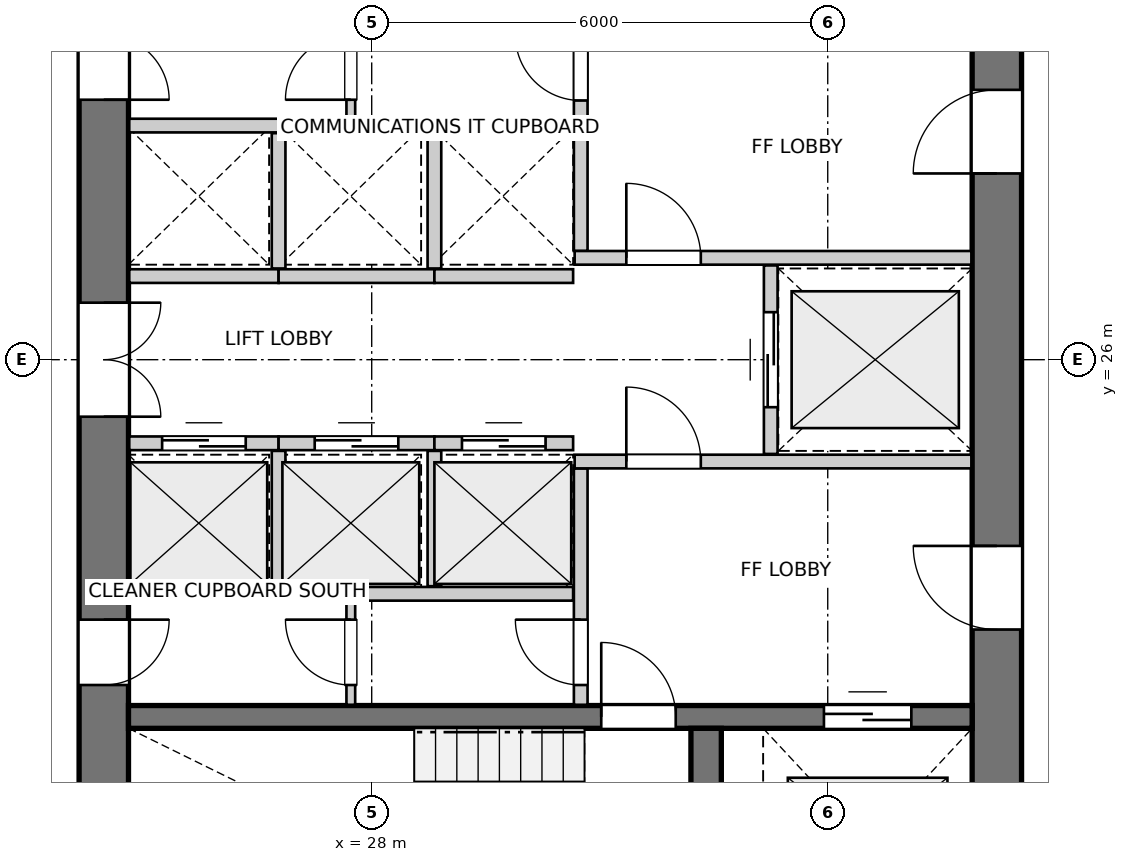
"""IFC4 building model, lengths in metres.
Left out: names, types, materials, properties, quantities, classifications, styles, units other than length and angle.
Written with IfcOpenShell. Run it as: python <this file> out.ifc"""

import sys

from ifc_helpers import new_model, si_unit, direction, frame, frame_2d, origin, place, context, subcontext, project, spatial, rectangle, extrude, source, transform, mapped, element, fill, save


model = new_model("IFC4")
c1 = context("Model", 3, precision=1e-05, world=origin(), true_north=direction((0.0, 1.0)))
c2 = subcontext(c1, "Body", "Model", "MODEL_VIEW")
j1 = project(units=[si_unit("LENGTHUNIT", "METRE"), si_unit("PLANEANGLEUNIT", "RADIAN")], contexts=[c1])
p1 = place(None, origin())
s1 = spatial("IfcSite", under=j1, at=p1, CompositionType="ELEMENT")
p2 = place(p1, origin())
s2 = spatial("IfcBuilding", under=s1, at=p2, CompositionType="ELEMENT")
p3 = place(p2, frame((0.0, 0.0, 83.2)))
s3 = spatial("IfcBuildingStorey", under=s2, at=p3, CompositionType="ELEMENT", Elevation=83.2)
p4 = place(p3, frame((24.475, 33.8, 0.0), z_axis=(0.0, 0.0, 1.0), x_axis=(0.0, -1.0, 0.0)))
e1 = element("IfcWall", 1, at=p4, inside=s3, PredefinedType="SHEAR", context=c2, shape_type="SweptSolid", body=[
    extrude(rectangle(XDim=15.6, YDim=0.65, at=frame_2d((7.8, 0.0))), origin(), (0.0, 0.0, 1.0), 2.935),
])
p5 = place(p4, frame((7.05, 0.0, 0.0)))
e2 = element("IfcOpeningElement", 2, at=p5, cuts=e1, PredefinedType="OPENING", context=c2, shape_type="SweptSolid", body=[
    extrude(rectangle(XDim=1.5, YDim=2.15, at=frame_2d((0.75, 1.075))), frame((0.0, 0.335, 0.0), z_axis=(0.0, -1.0, 0.0), x_axis=(1.0, 0.0, 0.0)), (0.0, 0.0, 1.0), 0.67),
])
p6 = place(p4, frame((3.52, 0.0, 0.0)))
e3 = element("IfcOpeningElement", 3, at=p6, cuts=e1, PredefinedType="OPENING", context=c2, shape_type="SweptSolid", body=[
    extrude(rectangle(XDim=0.86, YDim=2.05, at=frame_2d((0.43, 1.025))), frame((0.0, 0.335, 0.0), z_axis=(0.0, -1.0, 0.0), x_axis=(1.0, 0.0, 0.0)), (0.0, 0.0, 1.0), 0.67),
])
p7 = place(p4, frame((11.22, 0.0, 0.0)))
e4 = element("IfcOpeningElement", 4, at=p7, cuts=e1, PredefinedType="OPENING", context=c2, shape_type="SweptSolid", body=[
    extrude(rectangle(XDim=0.86, YDim=2.05, at=frame_2d((0.43, 1.025))), frame((0.0, 0.335, 0.0), z_axis=(0.0, -1.0, 0.0), x_axis=(1.0, 0.0, 0.0)), (0.0, 0.0, 1.0), 0.67),
])
p8 = place(p3, frame((36.225, 18.2, 0.0), z_axis=(0.0, 0.0, 1.0), x_axis=(0.0, 1.0, 0.0)))
e5 = element("IfcWall", 5, at=p8, inside=s3, PredefinedType="SHEAR", context=c2, shape_type="SweptSolid", body=[
    extrude(rectangle(XDim=15.6, YDim=0.65, at=frame_2d((7.8, 0.0))), origin(), (0.0, 0.0, 1.0), 2.935),
])
p9 = place(p8, frame((4.25, 0.0, 0.0)))
e6 = element("IfcOpeningElement", 6, at=p9, cuts=e5, PredefinedType="OPENING", context=c2, shape_type="SweptSolid", body=[
    extrude(rectangle(XDim=1.1, YDim=2.15, at=frame_2d((0.55, 1.075))), frame((0.0, 0.335, 0.0), z_axis=(0.0, -1.0, 0.0), x_axis=(1.0, 0.0, 0.0)), (0.0, 0.0, 1.0), 0.67),
])
p10 = place(p8, frame((10.25, 0.0, 0.0)))
e7 = element("IfcOpeningElement", 7, at=p10, cuts=e5, PredefinedType="OPENING", context=c2, shape_type="SweptSolid", body=[
    extrude(rectangle(XDim=1.1, YDim=2.15, at=frame_2d((0.55, 1.075))), frame((0.0, 0.335, 0.0), z_axis=(0.0, -1.0, 0.0), x_axis=(1.0, 0.0, 0.0)), (0.0, 0.0, 1.0), 0.67),
])
p11 = place(p3, frame((24.8, 21.3, 0.0), z_axis=(0.0, 0.0, 1.0), x_axis=(1.0, 0.0, 0.0)))
e8 = element("IfcWall", 8, at=p11, inside=s3, PredefinedType="SHEAR", context=c2, shape_type="SweptSolid", body=[
    extrude(rectangle(XDim=11.1, YDim=0.3, at=frame_2d((5.55, 0.0))), origin(), (0.0, 0.0, 1.0), 2.935),
])
p12 = place(p11, frame((6.22, 0.0, 0.0)))
e9 = element("IfcOpeningElement", 9, at=p12, cuts=e8, PredefinedType="OPENING", context=c2, shape_type="SweptSolid", body=[
    extrude(rectangle(XDim=0.98, YDim=2.15, at=frame_2d((0.49, 1.075))), frame((0.0, 0.16, 0.0), z_axis=(0.0, -1.0, 0.0), x_axis=(1.0, 0.0, 0.0)), (0.0, 0.0, 1.0), 0.32),
])
p13 = place(p11, frame((9.15, 0.0, 0.0)))
e10 = element("IfcOpeningElement", 10, at=p13, cuts=e8, PredefinedType="OPENING", context=c2, shape_type="SweptSolid", body=[
    extrude(rectangle(XDim=1.15, YDim=2.15, at=frame_2d((0.575, 1.075))), frame((0.0, 0.16, 0.0), z_axis=(0.0, -1.0, 0.0), x_axis=(1.0, 0.0, 0.0)), (0.0, 0.0, 1.0), 0.32),
])
p14 = place(p3, frame((32.4, 18.2, 0.0), z_axis=(0.0, 0.0, 1.0), x_axis=(0.0, 1.0, 0.0)))
e11 = element("IfcWall", 11, at=p14, inside=s3, PredefinedType="SHEAR", context=c2, shape_type="SweptSolid", body=[
    extrude(rectangle(XDim=2.95, YDim=0.4, at=frame_2d((1.475, 0.0))), origin(), (0.0, 0.0, 1.0), 2.935),
])
p15 = place(p3, frame((30.75, 21.46, 0.0), z_axis=(0.0, 0.0, 1.0), x_axis=(0.0, 1.0, 0.0)))
e12 = element("IfcWall", 12, at=p15, inside=s3, PredefinedType="PARTITIONING", context=c2, shape_type="SweptSolid", body=[
    extrude(rectangle(XDim=3.11, YDim=0.18, at=frame_2d((1.555, 0.0))), origin(), (0.0, 0.0, 1.0), 2.935),
])
p16 = place(p15, frame((0.26, 0.0, 0.0)))
e13 = element("IfcOpeningElement", 13, at=p16, cuts=e12, PredefinedType="OPENING", context=c2, shape_type="SweptSolid", body=[
    extrude(rectangle(XDim=0.86, YDim=2.05, at=frame_2d((0.43, 1.025))), frame((0.0, 0.1, 0.0), z_axis=(0.0, -1.0, 0.0), x_axis=(1.0, 0.0, 0.0)), (0.0, 0.0, 1.0), 0.2),
])
p17 = place(p3, frame((30.67, 24.66, 0.0), z_axis=(0.0, 0.0, 1.0), x_axis=(1.0, 0.0, 0.0)))
e14 = element("IfcWall", 14, at=p17, inside=s3, PredefinedType="PARTITIONING", context=c2, shape_type="SweptSolid", body=[
    extrude(rectangle(XDim=5.22, YDim=0.18, at=frame_2d((2.61, 0.0))), origin(), (0.0, 0.0, 1.0), 2.935),
])
p18 = place(p17, frame((0.68, 0.0, 0.0)))
e15 = element("IfcOpeningElement", 15, at=p18, cuts=e14, PredefinedType="OPENING", context=c2, shape_type="SweptSolid", body=[
    extrude(rectangle(XDim=0.98, YDim=2.15, at=frame_2d((0.49, 1.075))), frame((0.0, 0.1, 0.0), z_axis=(0.0, -1.0, 0.0), x_axis=(1.0, 0.0, 0.0)), (0.0, 0.0, 1.0), 0.2),
])
p19 = place(p3, frame((30.75, 27.43, 0.0), z_axis=(0.0, 0.0, 1.0), x_axis=(0.0, 1.0, 0.0)))
e16 = element("IfcWall", 16, at=p19, inside=s3, PredefinedType="PARTITIONING", context=c2, shape_type="SweptSolid", body=[
    extrude(rectangle(XDim=3.11, YDim=0.18, at=frame_2d((1.555, 0.0))), origin(), (0.0, 0.0, 1.0), 2.935),
])
p20 = place(p19, frame((1.98, 0.0, 0.0)))
e17 = element("IfcOpeningElement", 17, at=p20, cuts=e16, PredefinedType="OPENING", context=c2, shape_type="SweptSolid", body=[
    extrude(rectangle(XDim=0.86, YDim=2.05, at=frame_2d((0.43, 1.025))), frame((0.0, 0.1, 0.0), z_axis=(0.0, -1.0, 0.0), x_axis=(1.0, 0.0, 0.0)), (0.0, 0.0, 1.0), 0.2),
])
p21 = place(p3, frame((30.67, 27.34, 0.0), z_axis=(0.0, 0.0, 1.0), x_axis=(1.0, 0.0, 0.0)))
e18 = element("IfcWall", 18, at=p21, inside=s3, PredefinedType="PARTITIONING", context=c2, shape_type="SweptSolid", body=[
    extrude(rectangle(XDim=5.22, YDim=0.18, at=frame_2d((2.61, 0.0))), origin(), (0.0, 0.0, 1.0), 2.935),
])
p22 = place(p21, frame((0.68, 0.0, 0.0)))
e19 = element("IfcOpeningElement", 19, at=p22, cuts=e18, PredefinedType="OPENING", context=c2, shape_type="SweptSolid", body=[
    extrude(rectangle(XDim=0.98, YDim=2.15, at=frame_2d((0.49, 1.075))), frame((0.0, 0.1, 0.0), z_axis=(0.0, -1.0, 0.0), x_axis=(1.0, 0.0, 0.0)), (0.0, 0.0, 1.0), 0.2),
])
p23 = place(p3, frame((33.25, 24.76, 0.0), z_axis=(0.0, 0.0, 1.0), x_axis=(0.0, 1.0, 0.0)))
e20 = element("IfcWall", 20, at=p23, inside=s3, PredefinedType="PARTITIONING", context=c2, shape_type="SweptSolid", body=[
    extrude(rectangle(XDim=2.48, YDim=0.18, at=frame_2d((1.24, 0.0))), origin(), (0.0, 0.0, 1.0), 2.935),
])
p24 = place(p23, frame((0.615, 0.0, 0.0)))
e21 = element("IfcOpeningElement", 21, at=p24, cuts=e20, PredefinedType="OPENING", context=c2, shape_type="SweptSolid", body=[
    extrude(rectangle(XDim=1.25, YDim=2.15, at=frame_2d((0.625, 1.075))), frame((0.0, 0.1, 0.0), z_axis=(0.0, -1.0, 0.0), x_axis=(1.0, 0.0, 0.0)), (0.0, 0.0, 1.0), 0.2),
])
p25 = place(p3, frame((24.81, 22.92, 0.0), z_axis=(0.0, 0.0, 1.0), x_axis=(1.0, 0.0, 0.0)))
e22 = element("IfcWall", 22, at=p25, inside=s3, PredefinedType="PARTITIONING", context=c2, shape_type="SweptSolid", body=[
    extrude(rectangle(XDim=5.84, YDim=0.18, at=frame_2d((2.92, 0.0))), origin(), (0.0, 0.0, 1.0), 2.935),
])
p26 = place(p3, frame((24.81, 24.9, 0.0), z_axis=(0.0, 0.0, 1.0), x_axis=(1.0, 0.0, 0.0)))
e23 = element("IfcWall", 23, at=p26, inside=s3, PredefinedType="PARTITIONING", context=c2, shape_type="SweptSolid", body=[
    extrude(rectangle(XDim=1.965, YDim=0.18, at=frame_2d((0.982, 0.0))), origin(), (0.0, 0.0, 1.0), 2.935),
])
p27 = place(p26, frame((0.433, 0.0, 0.0)))
e24 = element("IfcOpeningElement", 24, at=p27, cuts=e23, PredefinedType="OPENING", context=c2, shape_type="SweptSolid", body=[
    extrude(rectangle(XDim=1.1, YDim=2.15, at=frame_2d((0.55, 1.075))), frame((0.0, 0.1, 0.0), z_axis=(0.0, -1.0, 0.0), x_axis=(1.0, 0.0, 0.0)), (0.0, 0.0, 1.0), 0.2),
])
p28 = place(p3, frame((26.775, 24.9, 0.0), z_axis=(0.0, 0.0, 1.0), x_axis=(1.0, 0.0, 0.0)))
e25 = element("IfcWall", 25, at=p28, inside=s3, PredefinedType="PARTITIONING", context=c2, shape_type="SweptSolid", body=[
    extrude(rectangle(XDim=2.05, YDim=0.18, at=frame_2d((1.025, 0.0))), origin(), (0.0, 0.0, 1.0), 2.935),
])
p29 = place(p28, frame((0.475, 0.0, 0.0)))
e26 = element("IfcOpeningElement", 26, at=p29, cuts=e25, PredefinedType="OPENING", context=c2, shape_type="SweptSolid", body=[
    extrude(rectangle(XDim=1.1, YDim=2.15, at=frame_2d((0.55, 1.075))), frame((0.0, 0.1, 0.0), z_axis=(0.0, -1.0, 0.0), x_axis=(1.0, 0.0, 0.0)), (0.0, 0.0, 1.0), 0.2),
])
p30 = place(p3, frame((26.775, 23.02, 0.0), z_axis=(0.0, 0.0, 1.0), x_axis=(0.0, 1.0, 0.0)))
e27 = element("IfcWall", 27, at=p30, inside=s3, PredefinedType="PARTITIONING", context=c2, shape_type="SweptSolid", body=[
    extrude(rectangle(XDim=1.78, YDim=0.18, at=frame_2d((0.89, 0.0))), origin(), (0.0, 0.0, 1.0), 2.935),
])
p31 = place(p3, frame((28.825, 24.9, 0.0), z_axis=(0.0, 0.0, 1.0), x_axis=(1.0, 0.0, 0.0)))
e28 = element("IfcWall", 28, at=p31, inside=s3, PredefinedType="PARTITIONING", context=c2, shape_type="SweptSolid", body=[
    extrude(rectangle(XDim=1.825, YDim=0.18, at=frame_2d((0.913, 0.0))), origin(), (0.0, 0.0, 1.0), 2.935),
])
p32 = place(p31, frame((0.363, 0.0, 0.0)))
e29 = element("IfcOpeningElement", 29, at=p32, cuts=e28, PredefinedType="OPENING", context=c2, shape_type="SweptSolid", body=[
    extrude(rectangle(XDim=1.1, YDim=2.15, at=frame_2d((0.55, 1.075))), frame((0.0, 0.1, 0.0), z_axis=(0.0, -1.0, 0.0), x_axis=(1.0, 0.0, 0.0)), (0.0, 0.0, 1.0), 0.2),
])
p33 = place(p3, frame((28.825, 23.02, 0.0), z_axis=(0.0, 0.0, 1.0), x_axis=(0.0, 1.0, 0.0)))
e30 = element("IfcWall", 30, at=p33, inside=s3, PredefinedType="PARTITIONING", context=c2, shape_type="SweptSolid", body=[
    extrude(rectangle(XDim=1.78, YDim=0.18, at=frame_2d((0.89, 0.0))), origin(), (0.0, 0.0, 1.0), 2.935),
])
p34 = place(p3, frame((24.81, 29.08, 0.0), z_axis=(0.0, 0.0, 1.0), x_axis=(1.0, 0.0, 0.0)))
e31 = element("IfcWall", 31, at=p34, inside=s3, PredefinedType="PARTITIONING", context=c2, shape_type="SweptSolid", body=[
    extrude(rectangle(XDim=5.84, YDim=0.18, at=frame_2d((2.92, 0.0))), origin(), (0.0, 0.0, 1.0), 2.935),
])
p35 = place(p3, frame((24.81, 27.1, 0.0), z_axis=(0.0, 0.0, 1.0), x_axis=(1.0, 0.0, 0.0)))
e32 = element("IfcWall", 32, at=p35, inside=s3, PredefinedType="PARTITIONING", context=c2, shape_type="SweptSolid", body=[
    extrude(rectangle(XDim=1.965, YDim=0.18, at=frame_2d((0.982, 0.0))), origin(), (0.0, 0.0, 1.0), 2.935),
])
p36 = place(p3, frame((26.775, 27.1, 0.0), z_axis=(0.0, 0.0, 1.0), x_axis=(1.0, 0.0, 0.0)))
e33 = element("IfcWall", 33, at=p36, inside=s3, PredefinedType="PARTITIONING", context=c2, shape_type="SweptSolid", body=[
    extrude(rectangle(XDim=2.05, YDim=0.18, at=frame_2d((1.025, 0.0))), origin(), (0.0, 0.0, 1.0), 2.935),
])
p37 = place(p3, frame((26.775, 27.2, 0.0), z_axis=(0.0, 0.0, 1.0), x_axis=(0.0, 1.0, 0.0)))
e34 = element("IfcWall", 34, at=p37, inside=s3, PredefinedType="PARTITIONING", context=c2, shape_type="SweptSolid", body=[
    extrude(rectangle(XDim=1.78, YDim=0.18, at=frame_2d((0.89, 0.0))), origin(), (0.0, 0.0, 1.0), 2.935),
])
p38 = place(p3, frame((28.825, 27.1, 0.0), z_axis=(0.0, 0.0, 1.0), x_axis=(1.0, 0.0, 0.0)))
e35 = element("IfcWall", 35, at=p38, inside=s3, PredefinedType="PARTITIONING", context=c2, shape_type="SweptSolid", body=[
    extrude(rectangle(XDim=1.825, YDim=0.18, at=frame_2d((0.913, 0.0))), origin(), (0.0, 0.0, 1.0), 2.935),
])
p39 = place(p3, frame((28.825, 27.2, 0.0), z_axis=(0.0, 0.0, 1.0), x_axis=(0.0, 1.0, 0.0)))
e36 = element("IfcWall", 36, at=p39, inside=s3, PredefinedType="PARTITIONING", context=c2, shape_type="SweptSolid", body=[
    extrude(rectangle(XDim=1.78, YDim=0.18, at=frame_2d((0.89, 0.0))), origin(), (0.0, 0.0, 1.0), 2.935),
])
p40 = place(p3, frame((27.725, 21.46, 0.0), z_axis=(0.0, 0.0, 1.0), x_axis=(0.0, 1.0, 0.0)))
e37 = element("IfcWall", 37, at=p40, inside=s3, PredefinedType="PARTITIONING", context=c2, shape_type="SweptSolid", body=[
    extrude(rectangle(XDim=1.38, YDim=0.115, at=frame_2d((0.69, 0.0))), origin(), (0.0, 0.0, 1.0), 2.935),
])
p41 = place(p40, frame((0.26, 0.0, 0.0)))
e38 = element("IfcOpeningElement", 38, at=p41, cuts=e37, PredefinedType="OPENING", context=c2, shape_type="SweptSolid", body=[
    extrude(rectangle(XDim=0.86, YDim=2.05, at=frame_2d((0.43, 1.025))), frame((0.0, 0.067, 0.0), z_axis=(0.0, -1.0, 0.0), x_axis=(1.0, 0.0, 0.0)), (0.0, 0.0, 1.0), 0.135),
])
p42 = place(p3, frame((27.725, 29.16, 0.0), z_axis=(0.0, 0.0, 1.0), x_axis=(0.0, 1.0, 0.0)))
e39 = element("IfcWall", 39, at=p42, inside=s3, PredefinedType="PARTITIONING", context=c2, shape_type="SweptSolid", body=[
    extrude(rectangle(XDim=1.38, YDim=0.115, at=frame_2d((0.69, 0.0))), origin(), (0.0, 0.0, 1.0), 2.935),
])
p43 = place(p42, frame((0.26, 0.0, 0.0)))
e40 = element("IfcOpeningElement", 40, at=p43, cuts=e39, PredefinedType="OPENING", context=c2, shape_type="SweptSolid", body=[
    extrude(rectangle(XDim=0.86, YDim=2.05, at=frame_2d((0.43, 1.025))), frame((0.0, 0.067, 0.0), z_axis=(0.0, -1.0, 0.0), x_axis=(1.0, 0.0, 0.0)), (0.0, 0.0, 1.0), 0.135),
])
m1 = source(origin(), c2, "Body", "SweptSolid", [
    extrude(rectangle(XDim=0.98, YDim=2.15, at=frame_2d((0.49, 1.075))), frame((0.0, 0.025, 0.0), z_axis=(0.0, -1.0, 0.0), x_axis=(1.0, 0.0, 0.0)), (0.0, 0.0, 1.0), 0.05),
])
p44 = place(p12, origin())
e41 = element("IfcDoor", 41, at=p44, inside=s3, OperationType="SINGLE_SWING_LEFT", PredefinedType="DOOR", context=c2, shape_type="MappedRepresentation", body=[
    mapped(m1, transform((0.0, 0.0, 0.0), x_axis=(1.0, 0.0, 0.0), y_axis=(0.0, 1.0, 0.0), z_axis=(0.0, 0.0, 1.0), scale=1.0)),
])
fill(e9, e41)
m2 = source(origin(), c2, "Body", "SweptSolid", [
    extrude(rectangle(XDim=1.15, YDim=2.15, at=frame_2d((0.575, 1.075))), frame((0.0, 0.025, 0.0), z_axis=(0.0, -1.0, 0.0), x_axis=(1.0, 0.0, 0.0)), (0.0, 0.0, 1.0), 0.05),
])
p45 = place(p13, origin())
e42 = element("IfcDoor", 42, at=p45, inside=s3, OperationType="DOUBLE_DOOR_SLIDING", PredefinedType="DOOR", context=c2, shape_type="MappedRepresentation", body=[
    mapped(m2, transform((0.0, 0.0, 0.0), x_axis=(1.0, 0.0, 0.0), y_axis=(0.0, 1.0, 0.0), z_axis=(0.0, 0.0, 1.0), scale=1.0)),
])
fill(e10, e42)
m3 = source(origin(), c2, "Body", "SweptSolid", [
    extrude(rectangle(XDim=1.1, YDim=2.15, at=frame_2d((0.55, 1.075))), frame((0.0, 0.025, 0.0), z_axis=(0.0, -1.0, 0.0), x_axis=(1.0, 0.0, 0.0)), (0.0, 0.0, 1.0), 0.05),
])
p46 = place(p9, origin())
e43 = element("IfcDoor", 43, at=p46, inside=s3, OperationType="SINGLE_SWING_RIGHT", PredefinedType="DOOR", context=c2, shape_type="MappedRepresentation", body=[
    mapped(m3, transform((0.0, 0.0, 0.0), x_axis=(1.0, 0.0, 0.0), y_axis=(0.0, 1.0, 0.0), z_axis=(0.0, 0.0, 1.0), scale=1.0)),
])
fill(e6, e43)
p47 = place(p10, origin())
e44 = element("IfcDoor", 44, at=p47, inside=s3, OperationType="SINGLE_SWING_LEFT", PredefinedType="DOOR", context=c2, shape_type="MappedRepresentation", body=[
    mapped(m3, transform((0.0, 0.0, 0.0), x_axis=(1.0, 0.0, 0.0), y_axis=(0.0, 1.0, 0.0), z_axis=(0.0, 0.0, 1.0), scale=1.0)),
])
fill(e7, e44)
m4 = source(origin(), c2, "Body", "SweptSolid", [
    extrude(rectangle(XDim=1.5, YDim=2.15, at=frame_2d((0.75, 1.075))), frame((0.0, 0.025, 0.0), z_axis=(0.0, -1.0, 0.0), x_axis=(1.0, 0.0, 0.0)), (0.0, 0.0, 1.0), 0.05),
])
p48 = place(p5, origin())
e45 = element("IfcDoor", 45, at=p48, inside=s3, OperationType="DOUBLE_DOOR_SINGLE_SWING", PredefinedType="DOOR", context=c2, shape_type="MappedRepresentation", body=[
    mapped(m4, transform((0.0, 0.0, 0.0), x_axis=(1.0, 0.0, 0.0), y_axis=(0.0, 1.0, 0.0), z_axis=(0.0, 0.0, 1.0), scale=1.0)),
])
fill(e2, e45)
m5 = source(origin(), c2, "Body", "SweptSolid", [
    extrude(rectangle(XDim=0.86, YDim=2.05, at=frame_2d((0.43, 1.025))), frame((0.0, 0.025, 0.0), z_axis=(0.0, -1.0, 0.0), x_axis=(1.0, 0.0, 0.0)), (0.0, 0.0, 1.0), 0.05),
])
p49 = place(p6, origin())
e46 = element("IfcDoor", 46, at=p49, inside=s3, OperationType="SINGLE_SWING_RIGHT", PredefinedType="DOOR", context=c2, shape_type="MappedRepresentation", body=[
    mapped(m5, transform((0.0, 0.0, 0.0), x_axis=(1.0, 0.0, 0.0), y_axis=(0.0, 1.0, 0.0), z_axis=(0.0, 0.0, 1.0), scale=1.0)),
])
fill(e3, e46)
p50 = place(p7, origin())
e47 = element("IfcDoor", 47, at=p50, inside=s3, OperationType="SINGLE_SWING_LEFT", PredefinedType="DOOR", context=c2, shape_type="MappedRepresentation", body=[
    mapped(m5, transform((0.0, 0.0, 0.0), x_axis=(1.0, 0.0, 0.0), y_axis=(0.0, 1.0, 0.0), z_axis=(0.0, 0.0, 1.0), scale=1.0)),
])
fill(e4, e47)
p51 = place(p16, origin())
e48 = element("IfcDoor", 48, at=p51, inside=s3, OperationType="SINGLE_SWING_RIGHT", PredefinedType="DOOR", context=c2, shape_type="MappedRepresentation", body=[
    mapped(m5, transform((0.0, 0.0, 0.0), x_axis=(1.0, 0.0, 0.0), y_axis=(0.0, 1.0, 0.0), z_axis=(0.0, 0.0, 1.0), scale=1.0)),
])
fill(e13, e48)
p52 = place(p18, origin())
e49 = element("IfcDoor", 49, at=p52, inside=s3, OperationType="SINGLE_SWING_LEFT", PredefinedType="DOOR", context=c2, shape_type="MappedRepresentation", body=[
    mapped(m1, transform((0.0, 0.0, 0.0), x_axis=(1.0, 0.0, 0.0), y_axis=(0.0, 1.0, 0.0), z_axis=(0.0, 0.0, 1.0), scale=1.0)),
])
fill(e15, e49)
p53 = place(p20, origin())
e50 = element("IfcDoor", 50, at=p53, inside=s3, OperationType="SINGLE_SWING_RIGHT", PredefinedType="DOOR", context=c2, shape_type="MappedRepresentation", body=[
    mapped(m5, transform((0.0, 0.0, 0.0), x_axis=(1.0, 0.0, 0.0), y_axis=(0.0, 1.0, 0.0), z_axis=(0.0, 0.0, 1.0), scale=1.0)),
])
fill(e17, e50)
p54 = place(p22, origin())
e51 = element("IfcDoor", 51, at=p54, inside=s3, OperationType="SINGLE_SWING_LEFT", PredefinedType="DOOR", context=c2, shape_type="MappedRepresentation", body=[
    mapped(m1, transform((0.0, 0.0, 0.0), x_axis=(1.0, 0.0, 0.0), y_axis=(0.0, 1.0, 0.0), z_axis=(0.0, 0.0, 1.0), scale=1.0)),
])
fill(e19, e51)
m6 = source(origin(), c2, "Body", "SweptSolid", [
    extrude(rectangle(XDim=1.25, YDim=2.15, at=frame_2d((0.625, 1.075))), frame((0.0, 0.025, 0.0), z_axis=(0.0, -1.0, 0.0), x_axis=(1.0, 0.0, 0.0)), (0.0, 0.0, 1.0), 0.05),
])
p55 = place(p24, origin())
e52 = element("IfcDoor", 52, at=p55, inside=s3, OperationType="DOUBLE_DOOR_SLIDING", PredefinedType="DOOR", context=c2, shape_type="MappedRepresentation", body=[
    mapped(m6, transform((0.0, 0.0, 0.0), x_axis=(1.0, 0.0, 0.0), y_axis=(0.0, 1.0, 0.0), z_axis=(0.0, 0.0, 1.0), scale=1.0)),
])
fill(e21, e52)
p56 = place(p27, origin())
e53 = element("IfcDoor", 53, at=p56, inside=s3, OperationType="DOUBLE_DOOR_SLIDING", PredefinedType="DOOR", context=c2, shape_type="MappedRepresentation", body=[
    mapped(m3, transform((0.0, 0.0, 0.0), x_axis=(1.0, 0.0, 0.0), y_axis=(0.0, 1.0, 0.0), z_axis=(0.0, 0.0, 1.0), scale=1.0)),
])
fill(e24, e53)
p57 = place(p29, origin())
e54 = element("IfcDoor", 54, at=p57, inside=s3, OperationType="DOUBLE_DOOR_SLIDING", PredefinedType="DOOR", context=c2, shape_type="MappedRepresentation", body=[
    mapped(m3, transform((0.0, 0.0, 0.0), x_axis=(1.0, 0.0, 0.0), y_axis=(0.0, 1.0, 0.0), z_axis=(0.0, 0.0, 1.0), scale=1.0)),
])
fill(e26, e54)
p58 = place(p32, origin())
e55 = element("IfcDoor", 55, at=p58, inside=s3, OperationType="DOUBLE_DOOR_SLIDING", PredefinedType="DOOR", context=c2, shape_type="MappedRepresentation", body=[
    mapped(m3, transform((0.0, 0.0, 0.0), x_axis=(1.0, 0.0, 0.0), y_axis=(0.0, 1.0, 0.0), z_axis=(0.0, 0.0, 1.0), scale=1.0)),
])
fill(e29, e55)
p59 = place(p41, origin())
e56 = element("IfcDoor", 56, at=p59, inside=s3, OperationType="SINGLE_SWING_RIGHT", PredefinedType="DOOR", context=c2, shape_type="MappedRepresentation", body=[
    mapped(m5, transform((0.0, 0.0, 0.0), x_axis=(1.0, 0.0, 0.0), y_axis=(0.0, 1.0, 0.0), z_axis=(0.0, 0.0, 1.0), scale=1.0)),
])
fill(e38, e56)
p60 = place(p43, origin())
e57 = element("IfcDoor", 57, at=p60, inside=s3, OperationType="SINGLE_SWING_LEFT", PredefinedType="DOOR", context=c2, shape_type="MappedRepresentation", body=[
    mapped(m5, transform((0.0, 0.0, 0.0), x_axis=(1.0, 0.0, 0.0), y_axis=(0.0, 1.0, 0.0), z_axis=(0.0, 0.0, 1.0), scale=1.0)),
])
fill(e40, e57)
save(model, sys.argv[1])
